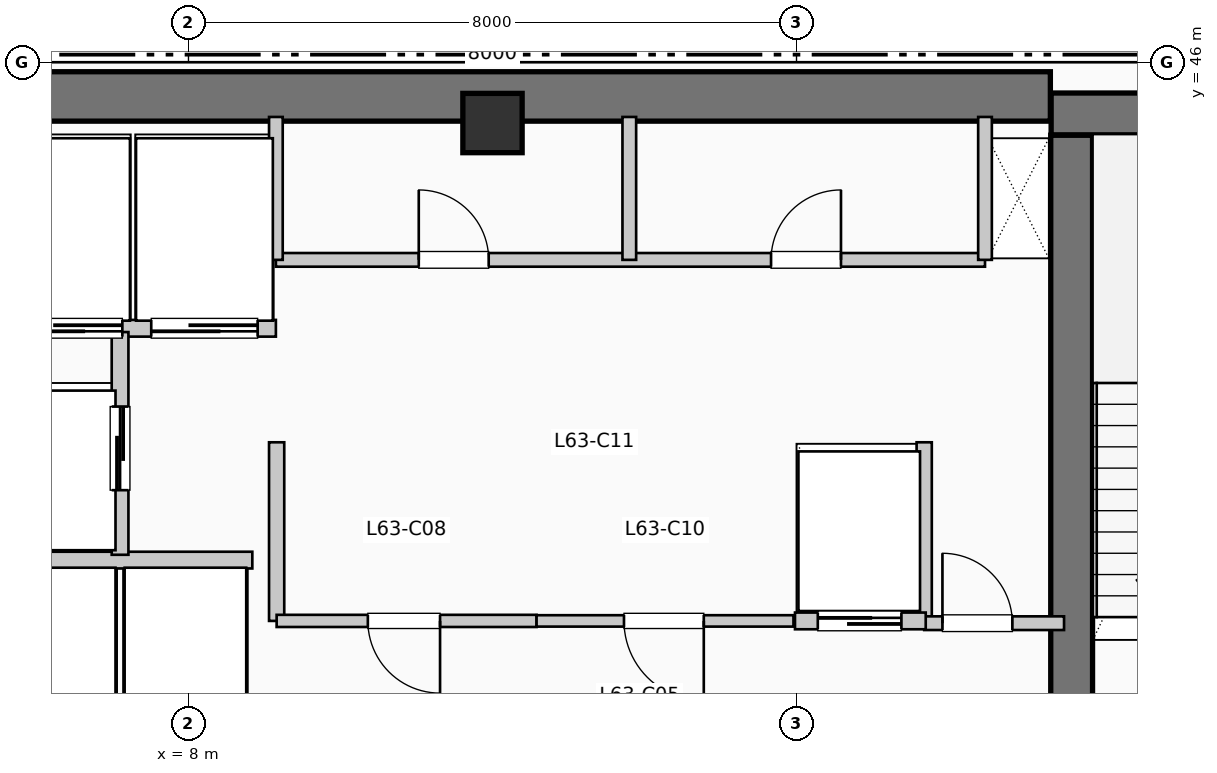
"""IFC4 building model, lengths in metres.
Left out: names, types, materials, properties, quantities, classifications, styles, units other than length and angle.
Written with IfcOpenShell. Run it as: python <this file> out.ifc"""

import sys

from ifc_helpers import new_model, si_unit, direction, frame, frame_2d, origin, origin_2d, place, context, subcontext, project, spatial, rectangle, extrude, element, fill, save


model = new_model("IFC4")
c1 = context("Model", 3, precision=1e-05, world=origin(), true_north=direction((0.0, 1.0)))
c2 = subcontext(c1, "Body", "Model", "MODEL_VIEW")
j1 = project(units=[si_unit("LENGTHUNIT", "METRE"), si_unit("PLANEANGLEUNIT", "RADIAN")], contexts=[c1])
p1 = place(None, origin())
s1 = spatial("IfcSite", under=j1, at=p1, CompositionType="ELEMENT")
p2 = place(p1, origin())
s2 = spatial("IfcBuilding", under=s1, at=p2, CompositionType="ELEMENT")
p3 = place(p2, frame((0.0, 0.0, 260.37)))
s3 = spatial("IfcBuildingStorey", under=s2, at=p3, CompositionType="ELEMENT", Elevation=260.37)
p4 = place(p3, frame((5.36, 45.55, 0.0), z_axis=(0.0, 0.0, 1.0), x_axis=(1.0, 0.0, 0.0)))
e1 = element("IfcWall", 1, at=p4, inside=s3, PredefinedType="SHEAR", context=c2, shape_type="SweptSolid", body=[
    extrude(rectangle(XDim=13.98, YDim=0.65, at=frame_2d((6.99, 0.0))), origin(), (0.0, 0.0, 1.0), 3.96),
])
p5 = place(p3, frame((19.62, 37.15, 0.0), z_axis=(0.0, 0.0, 1.0), x_axis=(0.0, 1.0, 0.0)))
e2 = element("IfcWall", 2, at=p5, inside=s3, PredefinedType="SHEAR", context=c2, shape_type="SweptSolid", body=[
    extrude(rectangle(XDim=7.89, YDim=0.55, at=frame_2d((3.945, 0.0))), origin(), (0.0, 0.0, 1.0), 3.96),
])
p6 = place(p3, frame((19.35, 45.32, 0.0), z_axis=(0.0, 0.0, 1.0), x_axis=(1.0, 0.0, 0.0)))
e3 = element("IfcWall", 3, at=p6, inside=s3, PredefinedType="SHEAR", context=c2, shape_type="SweptSolid", body=[
    extrude(rectangle(XDim=3.69, YDim=0.55, at=frame_2d((1.845, 0.0))), origin(), (0.0, 0.0, 1.0), 3.96),
])
p7 = place(p6, frame((1.15, 0.0, 1.05)))
e4 = element("IfcOpeningElement", 4, at=p7, cuts=e3, PredefinedType="OPENING", context=c2, shape_type="SweptSolid", body=[
    extrude(rectangle(XDim=1.4, YDim=1.8, at=frame_2d((0.7, 0.9))), frame((0.0, 0.285, 0.0), z_axis=(0.0, -1.0, 0.0), x_axis=(1.0, 0.0, 0.0)), (0.0, 0.0, 1.0), 0.57),
])
p8 = place(p3, frame((12.0, 45.2, 0.0), z_axis=(0.0, 0.0, 1.0), x_axis=(1.0, 0.0, 0.0)))
e5 = element("IfcColumn", 5, at=p8, inside=s3, PredefinedType="COLUMN", context=c2, shape_type="SweptSolid", body=[
    extrude(rectangle(XDim=0.78, YDim=0.78, at=origin_2d()), origin(), (0.0, 0.0, 1.0), 3.96),
])
p9 = place(p3, frame((5.38, 39.45, 0.0), z_axis=(0.0, 0.0, 1.0), x_axis=(1.0, 0.0, 0.0)))
e6 = element("IfcWall", 6, at=p9, inside=s3, PredefinedType="PARTITIONING", context=c2, shape_type="SweptSolid", body=[
    extrude(rectangle(XDim=3.46, YDim=0.22, at=frame_2d((1.73, 0.0))), origin(), (0.0, 0.0, 1.0), 3.71),
])
p10 = place(p3, frame((5.38, 42.5, 0.0), z_axis=(0.0, 0.0, 1.0), x_axis=(1.0, 0.0, 0.0)))
e7 = element("IfcWall", 7, at=p10, inside=s3, PredefinedType="PARTITIONING", context=c2, shape_type="SweptSolid", body=[
    extrude(rectangle(XDim=3.77, YDim=0.22, at=frame_2d((1.885, 0.0))), origin(), (0.0, 0.0, 1.0), 3.71),
])
p11 = place(p10, frame((1.75, 0.0, 0.0), z_axis=(0.0, 0.0, 1.0), x_axis=(-1.0, 0.0, 0.0)))
e8 = element("IfcOpeningElement", 8, at=p11, cuts=e7, PredefinedType="OPENING", context=c2, shape_type="SweptSolid", body=[
    extrude(rectangle(XDim=1.4, YDim=2.2, at=frame_2d((0.7, 1.1))), frame((0.0, 0.12, 0.0), z_axis=(0.0, -1.0, 0.0), x_axis=(1.0, 0.0, 0.0)), (0.0, 0.0, 1.0), 0.24),
])
p12 = place(p10, frame((3.53, 0.0, 0.0), z_axis=(0.0, 0.0, 1.0), x_axis=(-1.0, 0.0, 0.0)))
e9 = element("IfcOpeningElement", 9, at=p12, cuts=e7, PredefinedType="OPENING", context=c2, shape_type="SweptSolid", body=[
    extrude(rectangle(XDim=1.4, YDim=2.2, at=frame_2d((0.7, 1.1))), frame((0.0, 0.12, 0.0), z_axis=(0.0, -1.0, 0.0), x_axis=(1.0, 0.0, 0.0)), (0.0, 0.0, 1.0), 0.24),
])
p13 = place(p3, frame((7.1, 39.52, 0.0), z_axis=(0.0, 0.0, 1.0), x_axis=(0.0, 1.0, 0.0)))
e10 = element("IfcWall", 10, at=p13, inside=s3, PredefinedType="PARTITIONING", context=c2, shape_type="SweptSolid", body=[
    extrude(rectangle(XDim=2.93, YDim=0.22, at=frame_2d((1.465, 0.0))), origin(), (0.0, 0.0, 1.0), 3.71),
])
p14 = place(p13, frame((0.85, 0.0, 0.0)))
e11 = element("IfcOpeningElement", 11, at=p14, cuts=e10, PredefinedType="OPENING", context=c2, shape_type="SweptSolid", body=[
    extrude(rectangle(XDim=1.1, YDim=2.2, at=frame_2d((0.55, 1.1))), frame((0.0, 0.12, 0.0), z_axis=(0.0, -1.0, 0.0), x_axis=(1.0, 0.0, 0.0)), (0.0, 0.0, 1.0), 0.24),
])
for number, where, z_axis, x_axis in (
    (12, (9.16, 38.65, 0.0), (0.0, 0.0, 1.0), (0.0, 1.0, 0.0)),
    (13, (17.68, 38.65, 0.0), (0.0, 0.0, 1.0), (0.0, 1.0, 0.0)),
):
    element("IfcWall", number, at=place(p3, frame(where, z_axis=z_axis, x_axis=x_axis)), inside=s3, PredefinedType="PARTITIONING", context=c2, shape_type="SweptSolid", body=[
        extrude(rectangle(XDim=2.35, YDim=0.2, at=frame_2d((1.175, 0.0))), origin(), (0.0, 0.0, 1.0), 3.71),
    ])
p15 = place(p3, frame((17.68, 38.62, 0.0), z_axis=(0.0, 0.0, 1.0), x_axis=(1.0, 0.0, 0.0)))
e14 = element("IfcWall", 14, at=p15, inside=s3, PredefinedType="PARTITIONING", context=c2, shape_type="SweptSolid", body=[
    extrude(rectangle(XDim=1.84, YDim=0.18, at=frame_2d((0.92, 0.0))), origin(), (0.0, 0.0, 1.0), 3.71),
])
p16 = place(p15, frame((0.24, 0.0, 0.0)))
e15 = element("IfcOpeningElement", 15, at=p16, cuts=e14, PredefinedType="OPENING", context=c2, shape_type="SweptSolid", body=[
    extrude(rectangle(XDim=0.92, YDim=2.1, at=frame_2d((0.46, 1.05))), frame((0.0, 0.1, 0.0), z_axis=(0.0, -1.0, 0.0), x_axis=(1.0, 0.0, 0.0)), (0.0, 0.0, 1.0), 0.2),
])
p17 = place(p3, frame((9.16, 38.65, 0.0), z_axis=(0.0, 0.0, 1.0), x_axis=(1.0, 0.0, 0.0)))
e16 = element("IfcWall", 16, at=p17, inside=s3, PredefinedType="PARTITIONING", context=c2, shape_type="SweptSolid", body=[
    extrude(rectangle(XDim=3.42, YDim=0.16, at=frame_2d((1.71, 0.0))), origin(), (0.0, 0.0, 1.0), 3.71),
])
p18 = place(p17, frame((2.15, 0.0, 0.0), z_axis=(0.0, 0.0, 1.0), x_axis=(-1.0, 0.0, 0.0)))
e17 = element("IfcOpeningElement", 17, at=p18, cuts=e16, PredefinedType="OPENING", context=c2, shape_type="SweptSolid", body=[
    extrude(rectangle(XDim=0.95, YDim=2.15, at=frame_2d((0.475, 1.075))), frame((0.0, 0.09, 0.0), z_axis=(0.0, -1.0, 0.0), x_axis=(1.0, 0.0, 0.0)), (0.0, 0.0, 1.0), 0.18),
])
p19 = place(p3, frame((12.58, 38.65, 0.0), z_axis=(0.0, 0.0, 1.0), x_axis=(1.0, 0.0, 0.0)))
e18 = element("IfcWall", 18, at=p19, inside=s3, PredefinedType="PARTITIONING", context=c2, shape_type="SweptSolid", body=[
    extrude(rectangle(XDim=3.38, YDim=0.15, at=frame_2d((1.69, 0.0))), origin(), (0.0, 0.0, 1.0), 3.71),
])
p20 = place(p19, frame((2.2, 0.0, 0.0), z_axis=(0.0, 0.0, 1.0), x_axis=(-1.0, 0.0, 0.0)))
e19 = element("IfcOpeningElement", 19, at=p20, cuts=e18, PredefinedType="OPENING", context=c2, shape_type="SweptSolid", body=[
    extrude(rectangle(XDim=1.05, YDim=2.15, at=frame_2d((0.525, 1.075))), frame((0.0, 0.085, 0.0), z_axis=(0.0, -1.0, 0.0), x_axis=(1.0, 0.0, 0.0)), (0.0, 0.0, 1.0), 0.17),
])
p21 = place(p3, frame((15.98, 38.65, 0.0), z_axis=(0.0, 0.0, 1.0), x_axis=(1.0, 0.0, 0.0)))
e20 = element("IfcWall", 20, at=p21, inside=s3, PredefinedType="PARTITIONING", context=c2, shape_type="SweptSolid", body=[
    extrude(rectangle(XDim=1.72, YDim=0.22, at=frame_2d((0.86, 0.0))), origin(), (0.0, 0.0, 1.0), 3.71),
])
p22 = place(p21, frame((0.3, 0.0, 0.0)))
e21 = element("IfcOpeningElement", 21, at=p22, cuts=e20, PredefinedType="OPENING", context=c2, shape_type="SweptSolid", body=[
    extrude(rectangle(XDim=1.1, YDim=2.2, at=frame_2d((0.55, 1.1))), frame((0.0, 0.12, 0.0), z_axis=(0.0, -1.0, 0.0), x_axis=(1.0, 0.0, 0.0)), (0.0, 0.0, 1.0), 0.24),
])
p23 = place(p3, frame((9.15, 43.4, 0.0), z_axis=(0.0, 0.0, 1.0), x_axis=(1.0, 0.0, 0.0)))
e22 = element("IfcWall", 22, at=p23, inside=s3, PredefinedType="PLUMBINGWALL", context=c2, shape_type="SweptSolid", body=[
    extrude(rectangle(XDim=9.33, YDim=0.18, at=frame_2d((4.665, 0.0))), origin(), (0.0, 0.0, 1.0), 3.71),
])
p24 = place(p23, frame((1.88, 0.0, 0.0)))
e23 = element("IfcOpeningElement", 23, at=p24, cuts=e22, PredefinedType="OPENING", context=c2, shape_type="SweptSolid", body=[
    extrude(rectangle(XDim=0.92, YDim=2.1, at=frame_2d((0.46, 1.05))), frame((0.0, 0.1, 0.0), z_axis=(0.0, -1.0, 0.0), x_axis=(1.0, 0.0, 0.0)), (0.0, 0.0, 1.0), 0.2),
])
p25 = place(p23, frame((6.515, 0.0, 0.0)))
e24 = element("IfcOpeningElement", 24, at=p25, cuts=e22, PredefinedType="OPENING", context=c2, shape_type="SweptSolid", body=[
    extrude(rectangle(XDim=0.92, YDim=2.1, at=frame_2d((0.46, 1.05))), frame((0.0, 0.1, 0.0), z_axis=(0.0, -1.0, 0.0), x_axis=(1.0, 0.0, 0.0)), (0.0, 0.0, 1.0), 0.2),
])
for number, where, z_axis, x_axis in (
    (25, (9.15, 43.4, 0.0), (0.0, 0.0, 1.0), (0.0, 1.0, 0.0)),
    (26, (18.48, 43.4, 0.0), (0.0, 0.0, 1.0), (0.0, 1.0, 0.0)),
    (27, (13.8, 43.4, 0.0), (0.0, 0.0, 1.0), (0.0, 1.0, 0.0)),
):
    element("IfcWall", number, at=place(p3, frame(where, z_axis=z_axis, x_axis=x_axis)), inside=s3, PredefinedType="PLUMBINGWALL", context=c2, shape_type="SweptSolid", body=[
        extrude(rectangle(XDim=1.88, YDim=0.18, at=frame_2d((0.94, 0.0))), origin(), (0.0, 0.0, 1.0), 3.71),
    ])
p26 = place(p11, origin())
e28 = element("IfcDoor", 28, at=p26, inside=s3, OperationType="SLIDING_TO_LEFT", PredefinedType="DOOR", context=c2, shape_type="SweptSolid", body=[
    extrude(rectangle(XDim=1.4, YDim=2.2, at=frame_2d((0.7, 1.1))), frame((0.0, 0.025, 0.0), z_axis=(0.0, -1.0, 0.0), x_axis=(1.0, 0.0, 0.0)), (0.0, 0.0, 1.0), 0.05),
])
fill(e8, e28)
p27 = place(p12, origin())
e29 = element("IfcDoor", 29, at=p27, inside=s3, OperationType="SLIDING_TO_LEFT", PredefinedType="DOOR", context=c2, shape_type="SweptSolid", body=[
    extrude(rectangle(XDim=1.4, YDim=2.2, at=frame_2d((0.7, 1.1))), frame((0.0, 0.025, 0.0), z_axis=(0.0, -1.0, 0.0), x_axis=(1.0, 0.0, 0.0)), (0.0, 0.0, 1.0), 0.05),
])
fill(e9, e29)
p28 = place(p14, origin())
e30 = element("IfcDoor", 30, at=p28, inside=s3, OperationType="SLIDING_TO_LEFT", PredefinedType="DOOR", context=c2, shape_type="SweptSolid", body=[
    extrude(rectangle(XDim=1.1, YDim=2.2, at=frame_2d((0.55, 1.1))), frame((0.0, 0.025, 0.0), z_axis=(0.0, -1.0, 0.0), x_axis=(1.0, 0.0, 0.0)), (0.0, 0.0, 1.0), 0.05),
])
fill(e11, e30)
p29 = place(p16, origin())
e31 = element("IfcDoor", 31, at=p29, inside=s3, OperationType="SINGLE_SWING_LEFT", PredefinedType="DOOR", context=c2, shape_type="SweptSolid", body=[
    extrude(rectangle(XDim=0.92, YDim=2.1, at=frame_2d((0.46, 1.05))), frame((0.0, 0.025, 0.0), z_axis=(0.0, -1.0, 0.0), x_axis=(1.0, 0.0, 0.0)), (0.0, 0.0, 1.0), 0.05),
])
fill(e15, e31)
p30 = place(p18, origin())
e32 = element("IfcDoor", 32, at=p30, inside=s3, OperationType="SINGLE_SWING_RIGHT", PredefinedType="DOOR", context=c2, shape_type="SweptSolid", body=[
    extrude(rectangle(XDim=0.95, YDim=2.15, at=frame_2d((0.475, 1.075))), frame((0.0, 0.025, 0.0), z_axis=(0.0, -1.0, 0.0), x_axis=(1.0, 0.0, 0.0)), (0.0, 0.0, 1.0), 0.05),
])
fill(e17, e32)
p31 = place(p20, origin())
e33 = element("IfcDoor", 33, at=p31, inside=s3, OperationType="SINGLE_SWING_RIGHT", PredefinedType="DOOR", context=c2, shape_type="SweptSolid", body=[
    extrude(rectangle(XDim=1.05, YDim=2.15, at=frame_2d((0.525, 1.075))), frame((0.0, 0.025, 0.0), z_axis=(0.0, -1.0, 0.0), x_axis=(1.0, 0.0, 0.0)), (0.0, 0.0, 1.0), 0.05),
])
fill(e19, e33)
p32 = place(p22, origin())
e34 = element("IfcDoor", 34, at=p32, inside=s3, OperationType="SLIDING_TO_LEFT", PredefinedType="DOOR", context=c2, shape_type="SweptSolid", body=[
    extrude(rectangle(XDim=1.1, YDim=2.2, at=frame_2d((0.55, 1.1))), frame((0.0, 0.025, 0.0), z_axis=(0.0, -1.0, 0.0), x_axis=(1.0, 0.0, 0.0)), (0.0, 0.0, 1.0), 0.05),
])
fill(e21, e34)
p33 = place(p24, origin())
e35 = element("IfcDoor", 35, at=p33, inside=s3, OperationType="SINGLE_SWING_LEFT", PredefinedType="DOOR", context=c2, shape_type="SweptSolid", body=[
    extrude(rectangle(XDim=0.92, YDim=2.1, at=frame_2d((0.46, 1.05))), frame((0.0, 0.025, 0.0), z_axis=(0.0, -1.0, 0.0), x_axis=(1.0, 0.0, 0.0)), (0.0, 0.0, 1.0), 0.05),
])
fill(e23, e35)
p34 = place(p25, origin())
e36 = element("IfcDoor", 36, at=p34, inside=s3, OperationType="SINGLE_SWING_RIGHT", PredefinedType="DOOR", context=c2, shape_type="SweptSolid", body=[
    extrude(rectangle(XDim=0.92, YDim=2.1, at=frame_2d((0.46, 1.05))), frame((0.0, 0.025, 0.0), z_axis=(0.0, -1.0, 0.0), x_axis=(1.0, 0.0, 0.0)), (0.0, 0.0, 1.0), 0.05),
])
fill(e24, e36)
save(model, sys.argv[1])
